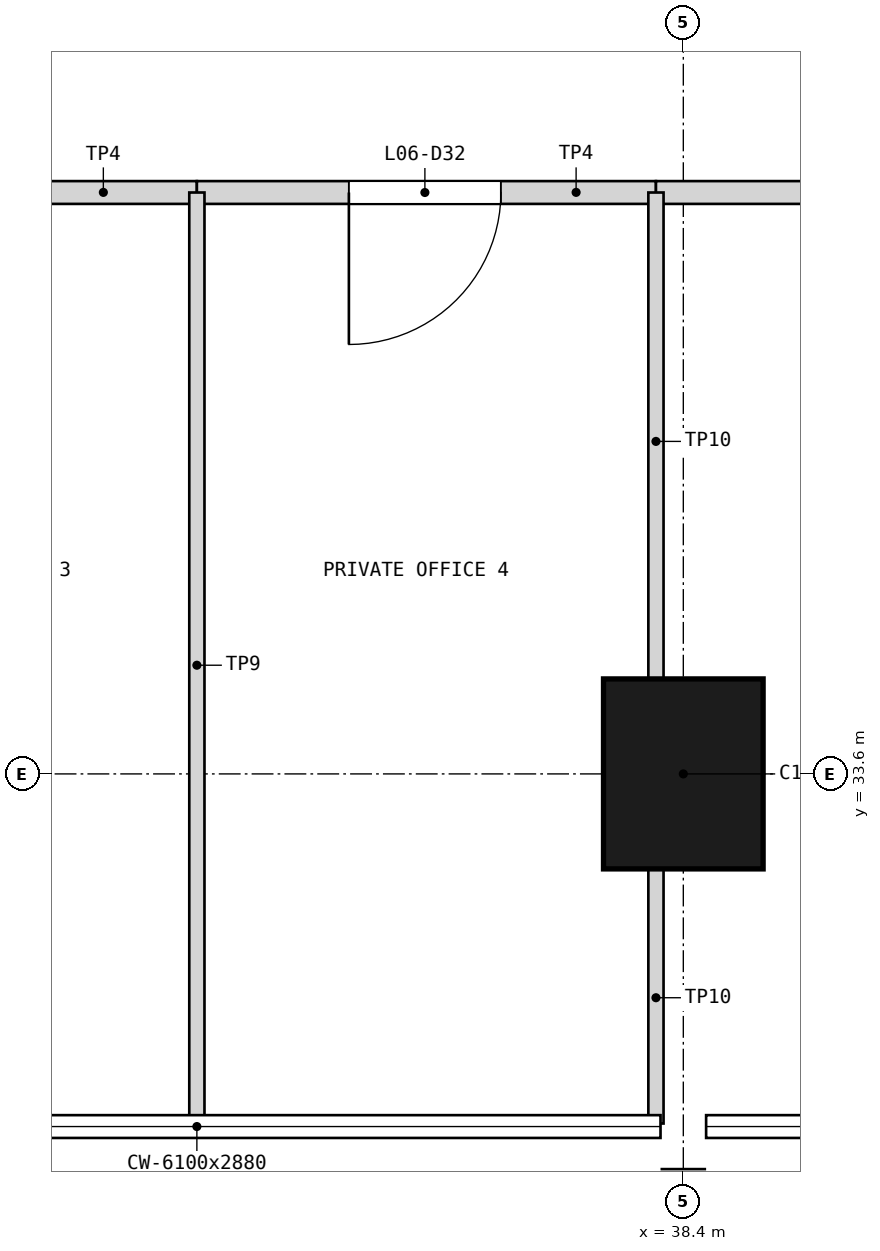
"""IFC4 building model, lengths in metres.
Left out: names, types, materials, properties, quantities, classifications, styles, units other than length and angle.
Written with IfcOpenShell. Run it as: python <this file> out.ifc"""

import sys

from ifc_helpers import new_model, si_unit, direction, frame, frame_2d, origin, origin_2d, place, context, subcontext, project, spatial, rectangle, extrude, element, fill, save


model = new_model("IFC4")
c1 = context("Model", 3, precision=1e-05, world=origin(), true_north=direction((0.0, 1.0)))
c2 = subcontext(c1, "Body", "Model", "MODEL_VIEW")
j1 = project(units=[si_unit("LENGTHUNIT", "METRE"), si_unit("PLANEANGLEUNIT", "RADIAN")], contexts=[c1])
p1 = place(None, origin())
s1 = spatial("IfcSite", under=j1, at=p1, CompositionType="ELEMENT")
p2 = place(p1, origin())
s2 = spatial("IfcBuilding", under=s1, at=p2, CompositionType="ELEMENT")
p3 = place(p2, frame((0.0, 0.0, 24.9)))
s3 = spatial("IfcBuildingStorey", under=s2, at=p3, CompositionType="ELEMENT", Elevation=24.9)
p4 = place(p3, frame((38.4, 33.6, 0.0), z_axis=(0.0, 0.0, 1.0), x_axis=(1.0, 0.0, 0.0)))
e1 = element("IfcColumn", 1, at=p4, inside=s3, PredefinedType="COLUMN", context=c2, shape_type="SweptSolid", body=[
    extrude(rectangle(XDim=1.05, YDim=1.25, at=origin_2d()), origin(), (0.0, 0.0, 1.0), 3.9),
])
p5 = place(p3, frame((31.82, 37.425, 0.0), z_axis=(0.0, 0.0, 1.0), x_axis=(1.0, 0.0, 0.0)))
e2 = element("IfcWall", 2, at=p5, inside=s3, PredefinedType="PARTITIONING", context=c2, shape_type="SweptSolid", body=[
    extrude(rectangle(XDim=3.38, YDim=0.15, at=frame_2d((1.69, 0.0))), origin(), (0.0, 0.0, 1.0), 3.68),
])
p6 = place(p5, frame((1.18, 0.0, 0.0)))
e3 = element("IfcOpeningElement", 3, at=p6, cuts=e2, PredefinedType="OPENING", context=c2, shape_type="SweptSolid", body=[
    extrude(rectangle(XDim=1.0, YDim=2.1, at=frame_2d((0.5, 1.05))), frame((0.0, 0.085, 0.0), z_axis=(0.0, -1.0, 0.0), x_axis=(1.0, 0.0, 0.0)), (0.0, 0.0, 1.0), 0.17),
])
p7 = place(p3, frame((35.2, 37.425, 0.0), z_axis=(0.0, 0.0, 1.0), x_axis=(1.0, 0.0, 0.0)))
e4 = element("IfcWall", 4, at=p7, inside=s3, PredefinedType="PARTITIONING", context=c2, shape_type="SweptSolid", body=[
    extrude(rectangle(XDim=3.02, YDim=0.15, at=frame_2d((1.51, 0.0))), origin(), (0.0, 0.0, 1.0), 3.68),
])
p8 = place(p7, frame((1.0, 0.0, 0.0)))
e5 = element("IfcOpeningElement", 5, at=p8, cuts=e4, PredefinedType="OPENING", context=c2, shape_type="SweptSolid", body=[
    extrude(rectangle(XDim=1.0, YDim=2.1, at=frame_2d((0.5, 1.05))), frame((0.0, 0.085, 0.0), z_axis=(0.0, -1.0, 0.0), x_axis=(1.0, 0.0, 0.0)), (0.0, 0.0, 1.0), 0.17),
])
p9 = place(p3, frame((38.22, 37.425, 0.0), z_axis=(0.0, 0.0, 1.0), x_axis=(1.0, 0.0, 0.0)))
e6 = element("IfcWall", 6, at=p9, inside=s3, PredefinedType="PARTITIONING", context=c2, shape_type="SweptSolid", body=[
    extrude(rectangle(XDim=13.16, YDim=0.15, at=frame_2d((6.58, 0.0))), origin(), (0.0, 0.0, 1.0), 3.68),
])
p10 = place(p9, frame((2.43, 0.0, 0.0)))
e7 = element("IfcOpeningElement", 7, at=p10, cuts=e6, PredefinedType="OPENING", context=c2, shape_type="SweptSolid", body=[
    extrude(rectangle(XDim=1.8, YDim=2.1, at=frame_2d((0.9, 1.05))), frame((0.0, 0.085, 0.0), z_axis=(0.0, -1.0, 0.0), x_axis=(1.0, 0.0, 0.0)), (0.0, 0.0, 1.0), 0.17),
])
p11 = place(p9, frame((8.93, 0.0, 0.0)))
e8 = element("IfcOpeningElement", 8, at=p11, cuts=e6, PredefinedType="OPENING", context=c2, shape_type="SweptSolid", body=[
    extrude(rectangle(XDim=1.8, YDim=2.1, at=frame_2d((0.9, 1.05))), frame((0.0, 0.085, 0.0), z_axis=(0.0, -1.0, 0.0), x_axis=(1.0, 0.0, 0.0)), (0.0, 0.0, 1.0), 0.17),
])
p12 = place(p3, frame((35.2, 31.3, 0.0), z_axis=(0.0, 0.0, 1.0), x_axis=(0.0, 1.0, 0.0)))
e9 = element("IfcWall", 9, at=p12, inside=s3, PredefinedType="PARTITIONING", context=c2, shape_type="SweptSolid", body=[
    extrude(rectangle(XDim=6.125, YDim=0.1, at=frame_2d((3.062, 0.0))), origin(), (0.0, 0.0, 1.0), 3.08),
])
p13 = place(p3, frame((38.22, 31.3, 0.0), z_axis=(0.0, 0.0, 1.0), x_axis=(0.0, 1.0, 0.0)))
e10 = element("IfcWall", 10, at=p13, inside=s3, PredefinedType="PARTITIONING", context=c2, shape_type="SweptSolid", body=[
    extrude(rectangle(XDim=1.695, YDim=0.1, at=frame_2d((0.848, 0.0))), origin(), (0.0, 0.0, 1.0), 2.78),
])
p14 = place(p3, frame((38.22, 34.205, 0.0), z_axis=(0.0, 0.0, 1.0), x_axis=(0.0, 1.0, 0.0)))
e11 = element("IfcWall", 11, at=p14, inside=s3, PredefinedType="PARTITIONING", context=c2, shape_type="SweptSolid", body=[
    extrude(rectangle(XDim=3.22, YDim=0.1, at=frame_2d((1.61, 0.0))), origin(), (0.0, 0.0, 1.0), 2.78),
])
p15 = place(p8, frame((1.0, 0.0, 0.0), z_axis=(0.0, 0.0, 1.0), x_axis=(-1.0, 0.0, 0.0)))
e12 = element("IfcDoor", 12, at=p15, inside=s3, OperationType="SINGLE_SWING_RIGHT", PredefinedType="DOOR", context=c2, shape_type="SweptSolid", body=[
    extrude(rectangle(XDim=1.0, YDim=2.1, at=frame_2d((0.5, 1.05))), frame((0.0, 0.025, 0.0), z_axis=(0.0, -1.0, 0.0), x_axis=(1.0, 0.0, 0.0)), (0.0, 0.0, 1.0), 0.05),
])
fill(e5, e12)
save(model, sys.argv[1])
